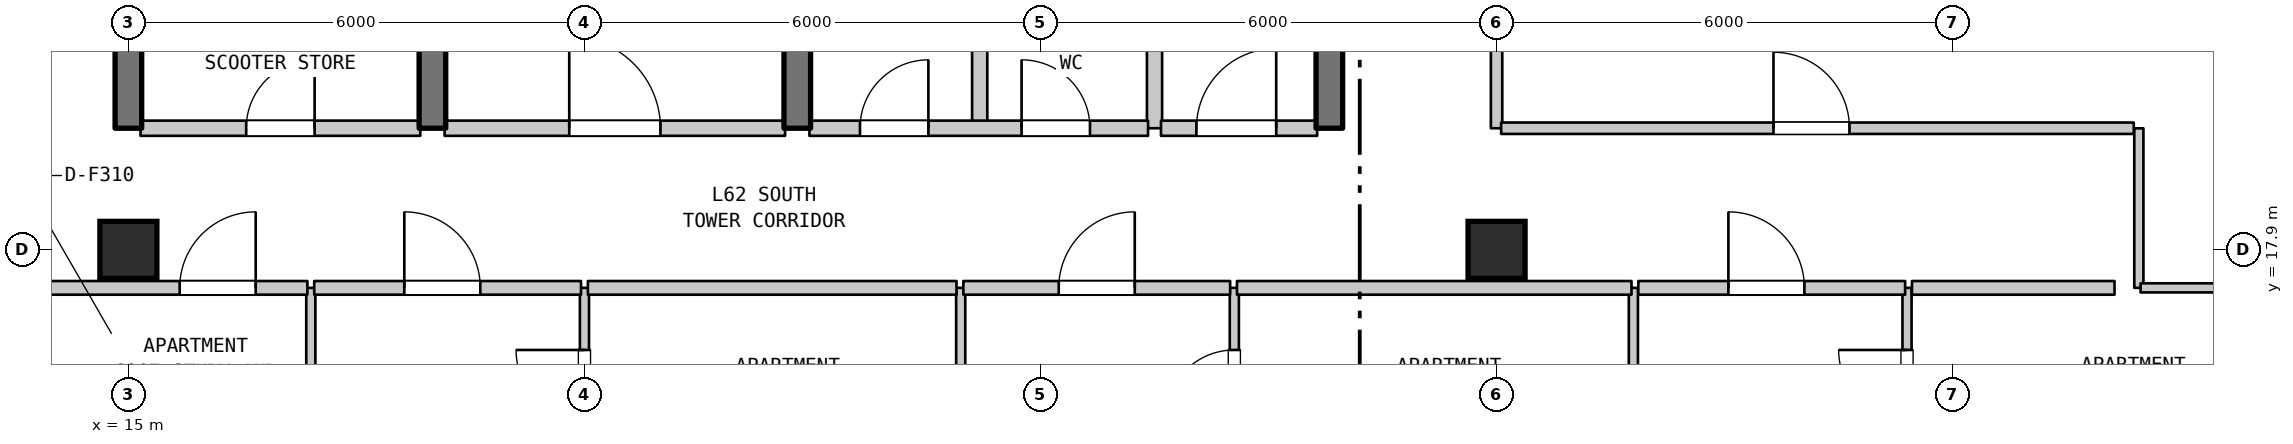
"""IFC4 building model, lengths in metres.
Left out: names, types, materials, properties, quantities, classifications, styles, units other than length and angle.
Written with IfcOpenShell. Run it as: python <this file> out.ifc"""

import sys

from ifc_helpers import new_model, si_unit, direction, frame, frame_2d, origin, origin_2d, place, context, subcontext, project, spatial, rectangle, extrude, element, fill, save


model = new_model("IFC4")
c1 = context("Model", 3, precision=1e-05, world=origin(), true_north=direction((0.0, 1.0)))
c2 = subcontext(c1, "Body", "Model", "MODEL_VIEW")
j1 = project(units=[si_unit("LENGTHUNIT", "METRE"), si_unit("PLANEANGLEUNIT", "RADIAN")], contexts=[c1])
p1 = place(None, origin())
s1 = spatial("IfcSite", under=j1, at=p1, CompositionType="ELEMENT")
p2 = place(p1, origin())
s2 = spatial("IfcBuilding", under=s1, at=p2, CompositionType="ELEMENT")
p3 = place(p2, frame((0.0, 0.0, 251.0)))
s3 = spatial("IfcBuildingStorey", under=s2, at=p3, CompositionType="ELEMENT", Elevation=251.0)
for number, where, z_axis, x_axis in (
    (1, (15.0, 17.9, 0.0), (0.0, 0.0, 1.0), (1.0, 0.0, 0.0)),
    (2, (33.0, 17.9, 0.0), (0.0, 0.0, 1.0), (1.0, 0.0, 0.0)),
):
    element("IfcColumn", number, at=place(p3, frame(where, z_axis=z_axis, x_axis=x_axis)), inside=s3, PredefinedType="COLUMN", context=c2, shape_type="SweptSolid", body=[
        extrude(rectangle(XDim=0.75, YDim=0.75, at=origin_2d()), origin(), (0.0, 0.0, 1.0), 3.7),
    ])
p4 = place(p3, frame((15.0, 19.5, 0.0), z_axis=(0.0, 0.0, 1.0), x_axis=(0.0, 1.0, 0.0)))
e3 = element("IfcWall", 3, at=p4, inside=s3, PredefinedType="SHEAR", context=c2, shape_type="SweptSolid", body=[
    extrude(rectangle(XDim=3.2, YDim=0.35, at=frame_2d((1.6, 0.0))), origin(), (0.0, 0.0, 1.0), 3.39),
])
p5 = place(p3, frame((17.4, 9.91, 0.0), z_axis=(0.0, 0.0, 1.0), x_axis=(0.0, 1.0, 0.0)))
e4 = element("IfcWall", 4, at=p5, inside=s3, PredefinedType="PARTITIONING", context=c2, shape_type="SweptSolid", body=[
    extrude(rectangle(XDim=7.49, YDim=0.12, at=frame_2d((3.745, 0.0))), origin(), (0.0, 0.0, 1.0), 3.39),
])
p6 = place(p3, frame((19.0, 19.5, 0.0), z_axis=(0.0, 0.0, 1.0), x_axis=(0.0, 1.0, 0.0)))
e5 = element("IfcWall", 5, at=p6, inside=s3, PredefinedType="SHEAR", context=c2, shape_type="SweptSolid", body=[
    extrude(rectangle(XDim=3.2, YDim=0.35, at=frame_2d((1.6, 0.0))), origin(), (0.0, 0.0, 1.0), 3.39),
])
p7 = place(p3, frame((21.0, 15.008, 0.0), z_axis=(0.0, 0.0, 1.0), x_axis=(0.0, 1.0, 0.0)))
e6 = element("IfcWall", 6, at=p7, inside=s3, PredefinedType="PARTITIONING", context=c2, shape_type="SweptSolid", body=[
    extrude(rectangle(XDim=2.392, YDim=0.12, at=frame_2d((1.196, 0.0))), origin(), (0.0, 0.0, 1.0), 3.39),
])
p8 = place(p7, frame((0.675, 0.0, 0.0)))
e7 = element("IfcOpeningElement", 7, at=p8, cuts=e6, PredefinedType="OPENING", context=c2, shape_type="SweptSolid", body=[
    extrude(rectangle(XDim=0.9, YDim=2.1, at=frame_2d((0.45, 1.05))), frame((0.0, 0.07, 0.0), z_axis=(0.0, -1.0, 0.0), x_axis=(1.0, 0.0, 0.0)), (0.0, 0.0, 1.0), 0.14),
])
p9 = place(p3, frame((23.8, 19.5, 0.0), z_axis=(0.0, 0.0, 1.0), x_axis=(0.0, 1.0, 0.0)))
e8 = element("IfcWall", 8, at=p9, inside=s3, PredefinedType="SHEAR", context=c2, shape_type="SweptSolid", body=[
    extrude(rectangle(XDim=3.2, YDim=0.35, at=frame_2d((1.6, 0.0))), origin(), (0.0, 0.0, 1.0), 3.39),
])
p10 = place(p3, frame((25.95, 15.008, 0.0), z_axis=(0.0, 0.0, 1.0), x_axis=(0.0, 1.0, 0.0)))
e9 = element("IfcWall", 9, at=p10, inside=s3, PredefinedType="PARTITIONING", context=c2, shape_type="SweptSolid", body=[
    extrude(rectangle(XDim=2.392, YDim=0.12, at=frame_2d((1.196, 0.0))), origin(), (0.0, 0.0, 1.0), 3.39),
])
for number, where, z_axis, x_axis in (
    (10, (26.2, 19.5, 0.0), (0.0, 0.0, 1.0), (0.0, 1.0, 0.0)),
    (11, (28.5, 19.5, 0.0), (0.0, 0.0, 1.0), (0.0, 1.0, 0.0)),
):
    element("IfcWall", number, at=place(p3, frame(where, z_axis=z_axis, x_axis=x_axis)), inside=s3, PredefinedType="STANDARD", context=c2, shape_type="SweptSolid", body=[
        extrude(rectangle(XDim=3.2, YDim=0.2, at=frame_2d((1.6, 0.0))), origin(), (0.0, 0.0, 1.0), 3.39),
    ])
p11 = place(p3, frame((29.55, 15.008, 0.0), z_axis=(0.0, 0.0, 1.0), x_axis=(0.0, 1.0, 0.0)))
e12 = element("IfcWall", 12, at=p11, inside=s3, PredefinedType="PARTITIONING", context=c2, shape_type="SweptSolid", body=[
    extrude(rectangle(XDim=2.392, YDim=0.12, at=frame_2d((1.196, 0.0))), origin(), (0.0, 0.0, 1.0), 3.39),
])
p12 = place(p11, frame((0.675, 0.0, 0.0)))
e13 = element("IfcOpeningElement", 13, at=p12, cuts=e12, PredefinedType="OPENING", context=c2, shape_type="SweptSolid", body=[
    extrude(rectangle(XDim=0.9, YDim=2.1, at=frame_2d((0.45, 1.05))), frame((0.0, 0.07, 0.0), z_axis=(0.0, -1.0, 0.0), x_axis=(1.0, 0.0, 0.0)), (0.0, 0.0, 1.0), 0.14),
])
p13 = place(p3, frame((30.8, 19.5, 0.0), z_axis=(0.0, 0.0, 1.0), x_axis=(0.0, 1.0, 0.0)))
e14 = element("IfcWall", 14, at=p13, inside=s3, PredefinedType="SHEAR", context=c2, shape_type="SweptSolid", body=[
    extrude(rectangle(XDim=3.2, YDim=0.35, at=frame_2d((1.6, 0.0))), origin(), (0.0, 0.0, 1.0), 3.39),
])
p14 = place(p3, frame((33.0, 19.5, 0.0), z_axis=(0.0, 0.0, 1.0), x_axis=(0.0, 1.0, 0.0)))
e15 = element("IfcWall", 15, at=p14, inside=s3, PredefinedType="STANDARD", context=c2, shape_type="SweptSolid", body=[
    extrude(rectangle(XDim=8.4, YDim=0.15, at=frame_2d((4.2, 0.0))), origin(), (0.0, 0.0, 1.0), 3.1),
])
p15 = place(p14, frame((4.48, 0.0, 0.0)))
e16 = element("IfcOpeningElement", 16, at=p15, cuts=e15, PredefinedType="OPENING", context=c2, shape_type="SweptSolid", body=[
    extrude(rectangle(XDim=1.0, YDim=2.15, at=frame_2d((0.5, 1.075))), frame((0.0, 0.085, 0.0), z_axis=(0.0, -1.0, 0.0), x_axis=(1.0, 0.0, 0.0)), (0.0, 0.0, 1.0), 0.17),
])
p16 = place(p3, frame((34.8, 15.008, 0.0), z_axis=(0.0, 0.0, 1.0), x_axis=(0.0, 1.0, 0.0)))
e17 = element("IfcWall", 17, at=p16, inside=s3, PredefinedType="PARTITIONING", context=c2, shape_type="SweptSolid", body=[
    extrude(rectangle(XDim=2.392, YDim=0.12, at=frame_2d((1.196, 0.0))), origin(), (0.0, 0.0, 1.0), 3.39),
])
p17 = place(p3, frame((38.4, 15.008, 0.0), z_axis=(0.0, 0.0, 1.0), x_axis=(0.0, 1.0, 0.0)))
e18 = element("IfcWall", 18, at=p17, inside=s3, PredefinedType="PARTITIONING", context=c2, shape_type="SweptSolid", body=[
    extrude(rectangle(XDim=2.392, YDim=0.12, at=frame_2d((1.196, 0.0))), origin(), (0.0, 0.0, 1.0), 3.39),
])
p18 = place(p17, frame((0.675, 0.0, 0.0)))
e19 = element("IfcOpeningElement", 19, at=p18, cuts=e18, PredefinedType="OPENING", context=c2, shape_type="SweptSolid", body=[
    extrude(rectangle(XDim=0.9, YDim=2.1, at=frame_2d((0.45, 1.05))), frame((0.0, 0.07, 0.0), z_axis=(0.0, -1.0, 0.0), x_axis=(1.0, 0.0, 0.0)), (0.0, 0.0, 1.0), 0.14),
])
p19 = place(p3, frame((41.45, 17.4, 0.0), z_axis=(0.0, 0.0, 1.0), x_axis=(0.0, 1.0, 0.0)))
e20 = element("IfcWall", 20, at=p19, inside=s3, PredefinedType="PARTITIONING", context=c2, shape_type="SweptSolid", body=[
    extrude(rectangle(XDim=2.099, YDim=0.12, at=frame_2d((1.05, 0.0))), origin(), (0.0, 0.0, 1.0), 3.39),
])
p20 = place(p3, frame((13.665, 17.4, 0.0), z_axis=(0.0, 0.0, 1.0), x_axis=(1.0, 0.0, 0.0)))
e21 = element("IfcWall", 21, at=p20, inside=s3, PredefinedType="STANDARD", context=c2, shape_type="SweptSolid", body=[
    extrude(rectangle(XDim=3.69, YDim=0.18, at=frame_2d((1.845, 0.0))), origin(), (0.0, 0.0, 1.0), 3.39),
])
p21 = place(p20, frame((2.01, 0.0, 0.0)))
e22 = element("IfcOpeningElement", 22, at=p21, cuts=e21, PredefinedType="OPENING", context=c2, shape_type="SweptSolid", body=[
    extrude(rectangle(XDim=1.0, YDim=2.15, at=frame_2d((0.5, 1.075))), frame((0.0, 0.1, 0.0), z_axis=(0.0, -1.0, 0.0), x_axis=(1.0, 0.0, 0.0)), (0.0, 0.0, 1.0), 0.2),
])
p22 = place(p3, frame((17.445, 17.4, 0.0), z_axis=(0.0, 0.0, 1.0), x_axis=(1.0, 0.0, 0.0)))
e23 = element("IfcWall", 23, at=p22, inside=s3, PredefinedType="STANDARD", context=c2, shape_type="SweptSolid", body=[
    extrude(rectangle(XDim=3.51, YDim=0.18, at=frame_2d((1.755, 0.0))), origin(), (0.0, 0.0, 1.0), 3.39),
])
p23 = place(p22, frame((1.185, 0.0, 0.0)))
e24 = element("IfcOpeningElement", 24, at=p23, cuts=e23, PredefinedType="OPENING", context=c2, shape_type="SweptSolid", body=[
    extrude(rectangle(XDim=1.0, YDim=2.15, at=frame_2d((0.5, 1.075))), frame((0.0, 0.1, 0.0), z_axis=(0.0, -1.0, 0.0), x_axis=(1.0, 0.0, 0.0)), (0.0, 0.0, 1.0), 0.2),
])
p24 = place(p3, frame((21.045, 17.4, 0.0), z_axis=(0.0, 0.0, 1.0), x_axis=(1.0, 0.0, 0.0)))
e25 = element("IfcWall", 25, at=p24, inside=s3, PredefinedType="STANDARD", context=c2, shape_type="SweptSolid", body=[
    extrude(rectangle(XDim=4.85, YDim=0.18, at=frame_2d((2.425, 0.0))), origin(), (0.0, 0.0, 1.0), 3.39),
])
p25 = place(p3, frame((25.985, 17.4, 0.0), z_axis=(0.0, 0.0, 1.0), x_axis=(1.0, 0.0, 0.0)))
e26 = element("IfcWall", 26, at=p25, inside=s3, PredefinedType="STANDARD", context=c2, shape_type="SweptSolid", body=[
    extrude(rectangle(XDim=3.51, YDim=0.18, at=frame_2d((1.755, 0.0))), origin(), (0.0, 0.0, 1.0), 3.39),
])
p26 = place(p25, frame((1.255, 0.0, 0.0)))
e27 = element("IfcOpeningElement", 27, at=p26, cuts=e26, PredefinedType="OPENING", context=c2, shape_type="SweptSolid", body=[
    extrude(rectangle(XDim=1.0, YDim=2.15, at=frame_2d((0.5, 1.075))), frame((0.0, 0.1, 0.0), z_axis=(0.0, -1.0, 0.0), x_axis=(1.0, 0.0, 0.0)), (0.0, 0.0, 1.0), 0.2),
])
p27 = place(p3, frame((29.585, 17.4, 0.0), z_axis=(0.0, 0.0, 1.0), x_axis=(1.0, 0.0, 0.0)))
e28 = element("IfcWall", 28, at=p27, inside=s3, PredefinedType="STANDARD", context=c2, shape_type="SweptSolid", body=[
    extrude(rectangle(XDim=5.19, YDim=0.18, at=frame_2d((2.595, 0.0))), origin(), (0.0, 0.0, 1.0), 3.39),
])
p28 = place(p3, frame((34.865, 17.4, 0.0), z_axis=(0.0, 0.0, 1.0), x_axis=(1.0, 0.0, 0.0)))
e29 = element("IfcWall", 29, at=p28, inside=s3, PredefinedType="STANDARD", context=c2, shape_type="SweptSolid", body=[
    extrude(rectangle(XDim=3.51, YDim=0.18, at=frame_2d((1.755, 0.0))), origin(), (0.0, 0.0, 1.0), 3.39),
])
p29 = place(p28, frame((1.185, 0.0, 0.0)))
e30 = element("IfcOpeningElement", 30, at=p29, cuts=e29, PredefinedType="OPENING", context=c2, shape_type="SweptSolid", body=[
    extrude(rectangle(XDim=1.0, YDim=2.15, at=frame_2d((0.5, 1.075))), frame((0.0, 0.1, 0.0), z_axis=(0.0, -1.0, 0.0), x_axis=(1.0, 0.0, 0.0)), (0.0, 0.0, 1.0), 0.2),
])
p30 = place(p3, frame((38.465, 17.4, 0.0), z_axis=(0.0, 0.0, 1.0), x_axis=(1.0, 0.0, 0.0)))
e31 = element("IfcWall", 31, at=p30, inside=s3, PredefinedType="STANDARD", context=c2, shape_type="SweptSolid", body=[
    extrude(rectangle(XDim=2.665, YDim=0.18, at=frame_2d((1.333, 0.0))), origin(), (0.0, 0.0, 1.0), 3.39),
])
p31 = place(p3, frame((41.473, 17.4, 0.0), z_axis=(0.0, 0.0, 1.0), x_axis=(1.0, 0.0, 0.0)))
e32 = element("IfcWall", 32, at=p31, inside=s3, PredefinedType="PARTITIONING", context=c2, shape_type="SweptSolid", body=[
    extrude(rectangle(XDim=2.031, YDim=0.12, at=frame_2d((1.016, 0.0))), origin(), (0.0, 0.0, 1.0), 3.39),
])
p32 = place(p3, frame((15.16, 19.5, 0.0), z_axis=(0.0, 0.0, 1.0), x_axis=(1.0, 0.0, 0.0)))
e33 = element("IfcWall", 33, at=p32, inside=s3, PredefinedType="STANDARD", context=c2, shape_type="SweptSolid", body=[
    extrude(rectangle(XDim=3.68, YDim=0.2, at=frame_2d((1.84, 0.0))), origin(), (0.0, 0.0, 1.0), 3.39),
])
p33 = place(p32, frame((1.39, 0.0, 0.0)))
e34 = element("IfcOpeningElement", 34, at=p33, cuts=e33, PredefinedType="OPENING", context=c2, shape_type="SweptSolid", body=[
    extrude(rectangle(XDim=0.9, YDim=2.15, at=frame_2d((0.45, 1.075))), frame((0.0, 0.11, 0.0), z_axis=(0.0, -1.0, 0.0), x_axis=(1.0, 0.0, 0.0)), (0.0, 0.0, 1.0), 0.22),
])
p34 = place(p3, frame((19.16, 19.5, 0.0), z_axis=(0.0, 0.0, 1.0), x_axis=(1.0, 0.0, 0.0)))
e35 = element("IfcWall", 35, at=p34, inside=s3, PredefinedType="STANDARD", context=c2, shape_type="SweptSolid", body=[
    extrude(rectangle(XDim=4.48, YDim=0.2, at=frame_2d((2.24, 0.0))), origin(), (0.0, 0.0, 1.0), 3.39),
])
p35 = place(p34, frame((1.64, 0.0, 0.0)))
e36 = element("IfcOpeningElement", 36, at=p35, cuts=e35, PredefinedType="OPENING", context=c2, shape_type="SweptSolid", body=[
    extrude(rectangle(XDim=1.2, YDim=2.2, at=frame_2d((0.6, 1.1))), frame((0.0, 0.11, 0.0), z_axis=(0.0, -1.0, 0.0), x_axis=(1.0, 0.0, 0.0)), (0.0, 0.0, 1.0), 0.22),
])
p36 = place(p3, frame((23.96, 19.5, 0.0), z_axis=(0.0, 0.0, 1.0), x_axis=(1.0, 0.0, 0.0)))
e37 = element("IfcWall", 37, at=p36, inside=s3, PredefinedType="STANDARD", context=c2, shape_type="SweptSolid", body=[
    extrude(rectangle(XDim=4.455, YDim=0.2, at=frame_2d((2.228, 0.0))), origin(), (0.0, 0.0, 1.0), 3.39),
])
p37 = place(p36, frame((0.665, 0.0, 0.0)))
e38 = element("IfcOpeningElement", 38, at=p37, cuts=e37, PredefinedType="OPENING", context=c2, shape_type="SweptSolid", body=[
    extrude(rectangle(XDim=0.9, YDim=2.15, at=frame_2d((0.45, 1.075))), frame((0.0, 0.11, 0.0), z_axis=(0.0, -1.0, 0.0), x_axis=(1.0, 0.0, 0.0)), (0.0, 0.0, 1.0), 0.22),
])
p38 = place(p36, frame((2.791, 0.0, 0.0)))
e39 = element("IfcOpeningElement", 39, at=p38, cuts=e37, PredefinedType="OPENING", context=c2, shape_type="SweptSolid", body=[
    extrude(rectangle(XDim=0.9, YDim=2.15, at=frame_2d((0.45, 1.075))), frame((0.0, 0.11, 0.0), z_axis=(0.0, -1.0, 0.0), x_axis=(1.0, 0.0, 0.0)), (0.0, 0.0, 1.0), 0.22),
])
p39 = place(p3, frame((28.585, 19.5, 0.0), z_axis=(0.0, 0.0, 1.0), x_axis=(1.0, 0.0, 0.0)))
e40 = element("IfcWall", 40, at=p39, inside=s3, PredefinedType="STANDARD", context=c2, shape_type="SweptSolid", body=[
    extrude(rectangle(XDim=2.055, YDim=0.2, at=frame_2d((1.027, 0.0))), origin(), (0.0, 0.0, 1.0), 3.39),
])
p40 = place(p39, frame((0.466, 0.0, 0.0)))
e41 = element("IfcOpeningElement", 41, at=p40, cuts=e40, PredefinedType="OPENING", context=c2, shape_type="SweptSolid", body=[
    extrude(rectangle(XDim=1.05, YDim=2.15, at=frame_2d((0.525, 1.075))), frame((0.0, 0.11, 0.0), z_axis=(0.0, -1.0, 0.0), x_axis=(1.0, 0.0, 0.0)), (0.0, 0.0, 1.0), 0.22),
])
p41 = place(p3, frame((33.06, 19.5, 0.0), z_axis=(0.0, 0.0, 1.0), x_axis=(1.0, 0.0, 0.0)))
e42 = element("IfcWall", 42, at=p41, inside=s3, PredefinedType="STANDARD", context=c2, shape_type="SweptSolid", body=[
    extrude(rectangle(XDim=8.323, YDim=0.15, at=frame_2d((4.162, 0.0))), origin(), (0.0, 0.0, 1.0), 3.39),
])
p42 = place(p41, frame((3.583, 0.0, 0.0)))
e43 = element("IfcOpeningElement", 43, at=p42, cuts=e42, PredefinedType="OPENING", context=c2, shape_type="SweptSolid", body=[
    extrude(rectangle(XDim=1.0, YDim=2.15, at=frame_2d((0.5, 1.075))), frame((0.0, 0.085, 0.0), z_axis=(0.0, -1.0, 0.0), x_axis=(1.0, 0.0, 0.0)), (0.0, 0.0, 1.0), 0.17),
])
p43 = place(p8, origin())
e44 = element("IfcDoor", 44, at=p43, inside=s3, OperationType="SINGLE_SWING_RIGHT", PredefinedType="DOOR", context=c2, shape_type="SweptSolid", body=[
    extrude(rectangle(XDim=0.9, YDim=2.1, at=frame_2d((0.45, 1.05))), frame((0.0, 0.025, 0.0), z_axis=(0.0, -1.0, 0.0), x_axis=(1.0, 0.0, 0.0)), (0.0, 0.0, 1.0), 0.05),
])
fill(e7, e44)
p44 = place(p12, origin())
e45 = element("IfcDoor", 45, at=p44, inside=s3, OperationType="SINGLE_SWING_LEFT", PredefinedType="DOOR", context=c2, shape_type="SweptSolid", body=[
    extrude(rectangle(XDim=0.9, YDim=2.1, at=frame_2d((0.45, 1.05))), frame((0.0, 0.025, 0.0), z_axis=(0.0, -1.0, 0.0), x_axis=(1.0, 0.0, 0.0)), (0.0, 0.0, 1.0), 0.05),
])
fill(e13, e45)
p45 = place(p18, origin())
e46 = element("IfcDoor", 46, at=p45, inside=s3, OperationType="SINGLE_SWING_RIGHT", PredefinedType="DOOR", context=c2, shape_type="SweptSolid", body=[
    extrude(rectangle(XDim=0.9, YDim=2.1, at=frame_2d((0.45, 1.05))), frame((0.0, 0.025, 0.0), z_axis=(0.0, -1.0, 0.0), x_axis=(1.0, 0.0, 0.0)), (0.0, 0.0, 1.0), 0.05),
])
fill(e19, e46)
p46 = place(p21, origin())
e47 = element("IfcDoor", 47, at=p46, inside=s3, OperationType="SINGLE_SWING_RIGHT", PredefinedType="DOOR", context=c2, shape_type="SweptSolid", body=[
    extrude(rectangle(XDim=1.0, YDim=2.15, at=frame_2d((0.5, 1.075))), frame((0.0, 0.025, 0.0), z_axis=(0.0, -1.0, 0.0), x_axis=(1.0, 0.0, 0.0)), (0.0, 0.0, 1.0), 0.05),
])
fill(e22, e47)
p47 = place(p23, origin())
e48 = element("IfcDoor", 48, at=p47, inside=s3, OperationType="SINGLE_SWING_LEFT", PredefinedType="DOOR", context=c2, shape_type="SweptSolid", body=[
    extrude(rectangle(XDim=1.0, YDim=2.15, at=frame_2d((0.5, 1.075))), frame((0.0, 0.025, 0.0), z_axis=(0.0, -1.0, 0.0), x_axis=(1.0, 0.0, 0.0)), (0.0, 0.0, 1.0), 0.05),
])
fill(e24, e48)
p48 = place(p26, origin())
e49 = element("IfcDoor", 49, at=p48, inside=s3, OperationType="SINGLE_SWING_RIGHT", PredefinedType="DOOR", context=c2, shape_type="SweptSolid", body=[
    extrude(rectangle(XDim=1.0, YDim=2.15, at=frame_2d((0.5, 1.075))), frame((0.0, 0.025, 0.0), z_axis=(0.0, -1.0, 0.0), x_axis=(1.0, 0.0, 0.0)), (0.0, 0.0, 1.0), 0.05),
])
fill(e27, e49)
p49 = place(p29, origin())
e50 = element("IfcDoor", 50, at=p49, inside=s3, OperationType="SINGLE_SWING_LEFT", PredefinedType="DOOR", context=c2, shape_type="SweptSolid", body=[
    extrude(rectangle(XDim=1.0, YDim=2.15, at=frame_2d((0.5, 1.075))), frame((0.0, 0.025, 0.0), z_axis=(0.0, -1.0, 0.0), x_axis=(1.0, 0.0, 0.0)), (0.0, 0.0, 1.0), 0.05),
])
fill(e30, e50)
p50 = place(p33, origin())
e51 = element("IfcDoor", 51, at=p50, inside=s3, OperationType="SINGLE_SWING_RIGHT", PredefinedType="DOOR", context=c2, shape_type="SweptSolid", body=[
    extrude(rectangle(XDim=0.9, YDim=2.15, at=frame_2d((0.45, 1.075))), frame((0.0, 0.025, 0.0), z_axis=(0.0, -1.0, 0.0), x_axis=(1.0, 0.0, 0.0)), (0.0, 0.0, 1.0), 0.05),
])
fill(e34, e51)
p51 = place(p35, origin())
e52 = element("IfcDoor", 52, at=p51, inside=s3, OperationType="SINGLE_SWING_LEFT", PredefinedType="DOOR", context=c2, shape_type="SweptSolid", body=[
    extrude(rectangle(XDim=1.2, YDim=2.2, at=frame_2d((0.6, 1.1))), frame((0.0, 0.025, 0.0), z_axis=(0.0, -1.0, 0.0), x_axis=(1.0, 0.0, 0.0)), (0.0, 0.0, 1.0), 0.05),
])
fill(e36, e52)
p52 = place(p37, origin())
e53 = element("IfcDoor", 53, at=p52, inside=s3, OperationType="SINGLE_SWING_RIGHT", PredefinedType="DOOR", context=c2, shape_type="SweptSolid", body=[
    extrude(rectangle(XDim=0.9, YDim=2.15, at=frame_2d((0.45, 1.075))), frame((0.0, 0.025, 0.0), z_axis=(0.0, -1.0, 0.0), x_axis=(1.0, 0.0, 0.0)), (0.0, 0.0, 1.0), 0.05),
])
fill(e38, e53)
p53 = place(p38, origin())
e54 = element("IfcDoor", 54, at=p53, inside=s3, OperationType="SINGLE_SWING_LEFT", PredefinedType="DOOR", context=c2, shape_type="SweptSolid", body=[
    extrude(rectangle(XDim=0.9, YDim=2.15, at=frame_2d((0.45, 1.075))), frame((0.0, 0.025, 0.0), z_axis=(0.0, -1.0, 0.0), x_axis=(1.0, 0.0, 0.0)), (0.0, 0.0, 1.0), 0.05),
])
fill(e39, e54)
p54 = place(p40, origin())
e55 = element("IfcDoor", 55, at=p54, inside=s3, OperationType="SINGLE_SWING_RIGHT", PredefinedType="DOOR", context=c2, shape_type="SweptSolid", body=[
    extrude(rectangle(XDim=1.05, YDim=2.15, at=frame_2d((0.525, 1.075))), frame((0.0, 0.025, 0.0), z_axis=(0.0, -1.0, 0.0), x_axis=(1.0, 0.0, 0.0)), (0.0, 0.0, 1.0), 0.05),
])
fill(e41, e55)
p55 = place(p42, origin())
e56 = element("IfcDoor", 56, at=p55, inside=s3, OperationType="SINGLE_SWING_LEFT", PredefinedType="DOOR", context=c2, shape_type="SweptSolid", body=[
    extrude(rectangle(XDim=1.0, YDim=2.15, at=frame_2d((0.5, 1.075))), frame((0.0, 0.025, 0.0), z_axis=(0.0, -1.0, 0.0), x_axis=(1.0, 0.0, 0.0)), (0.0, 0.0, 1.0), 0.05),
])
fill(e43, e56)
save(model, sys.argv[1])
